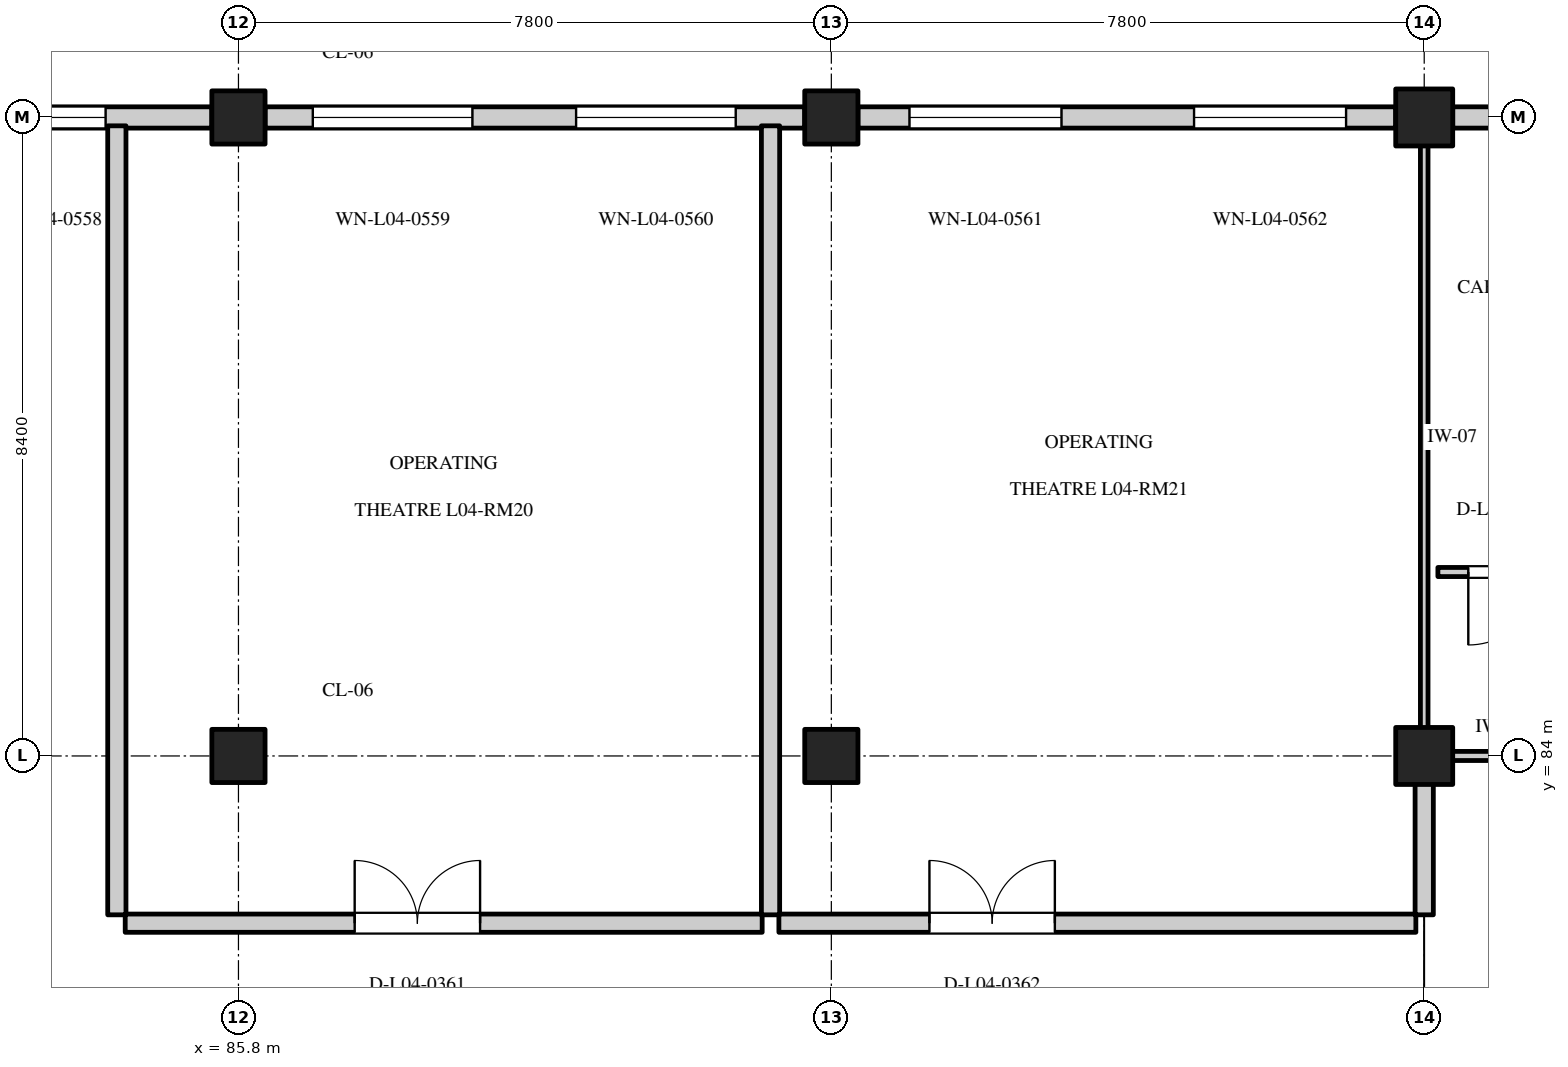
"""IFC4 building model, lengths in metres.
Left out: names, types, materials, properties, quantities, classifications, styles, units other than length and angle.
Written with IfcOpenShell. Run it as: python <this file> out.ifc"""

import sys

from ifc_helpers import new_model, si_unit, direction, frame, frame_2d, origin, origin_2d, place, context, subcontext, project, spatial, rectangle, extrude, element, fill, save


model = new_model("IFC4")
c1 = context("Model", 3, precision=1e-05, world=origin(), true_north=direction((0.0, 1.0)))
c2 = subcontext(c1, "Body", "Model", "MODEL_VIEW")
j1 = project(units=[si_unit("LENGTHUNIT", "METRE"), si_unit("PLANEANGLEUNIT", "RADIAN")], contexts=[c1])
p1 = place(None, origin())
s1 = spatial("IfcSite", under=j1, at=p1, CompositionType="ELEMENT")
p2 = place(p1, origin())
s2 = spatial("IfcBuilding", under=s1, at=p2, CompositionType="ELEMENT")
p3 = place(p2, frame((0.0, 0.0, 18.0)))
s3 = spatial("IfcBuildingStorey", under=s2, at=p3, CompositionType="ELEMENT", Elevation=18.0)
for number, where, z_axis, x_axis in (
    (1, (85.8, 84.0, 0.0), (0.0, 0.0, 1.0), (1.0, 0.0, 0.0)),
    (2, (85.8, 92.4, 0.0), (0.0, 0.0, 1.0), (1.0, 0.0, 0.0)),
    (3, (93.6, 84.0, 0.0), (0.0, 0.0, 1.0), (1.0, 0.0, 0.0)),
    (4, (93.6, 92.4, 0.0), (0.0, 0.0, 1.0), (1.0, 0.0, 0.0)),
):
    element("IfcColumn", number, at=place(p3, frame(where, z_axis=z_axis, x_axis=x_axis)), inside=s3, PredefinedType="COLUMN", context=c2, shape_type="SweptSolid", body=[
        extrude(rectangle(XDim=0.7, YDim=0.7, at=origin_2d()), origin(), (0.0, 0.0, 1.0), 4.2),
    ])
for number, where, z_axis, x_axis in (
    (5, (101.4, 84.0, 0.0), (0.0, 0.0, 1.0), (1.0, 0.0, 0.0)),
    (6, (101.4, 92.4, 0.0), (0.0, 0.0, 1.0), (1.0, 0.0, 0.0)),
):
    element("IfcColumn", number, at=place(p3, frame(where, z_axis=z_axis, x_axis=x_axis)), inside=s3, PredefinedType="COLUMN", context=c2, shape_type="SweptSolid", body=[
        extrude(rectangle(XDim=0.75, YDim=0.75, at=origin_2d()), origin(), (0.0, 0.0, 1.0), 4.2),
    ])
p4 = place(p3, frame((78.35, 92.4, 0.0), z_axis=(0.0, 0.0, 1.0), x_axis=(1.0, 0.0, 0.0)))
e7 = element("IfcWall", 7, at=p4, inside=s3, PredefinedType="STANDARD", context=c2, shape_type="SweptSolid", body=[
    extrude(rectangle(XDim=7.1, YDim=0.28, at=frame_2d((3.55, 0.0))), origin(), (0.0, 0.0, 1.0), 3.335),
])
p5 = place(p4, frame((0.628, 0.0, 0.8)))
e8 = element("IfcOpeningElement", 8, at=p5, cuts=e7, PredefinedType="OPENING", context=c2, shape_type="SweptSolid", body=[
    extrude(rectangle(XDim=2.1, YDim=1.55, at=frame_2d((1.05, 0.775))), frame((0.0, 0.152, 0.0), z_axis=(0.0, -1.0, 0.0), x_axis=(1.0, 0.0, 0.0)), (0.0, 0.0, 1.0), 0.304),
])
p6 = place(p4, frame((4.102, 0.0, 0.8)))
e9 = element("IfcOpeningElement", 9, at=p6, cuts=e7, PredefinedType="OPENING", context=c2, shape_type="SweptSolid", body=[
    extrude(rectangle(XDim=1.6, YDim=1.65, at=frame_2d((0.8, 0.825))), frame((0.0, 0.152, 0.0), z_axis=(0.0, -1.0, 0.0), x_axis=(1.0, 0.0, 0.0)), (0.0, 0.0, 1.0), 0.304),
])
p7 = place(p3, frame((86.15, 92.4, 0.0), z_axis=(0.0, 0.0, 1.0), x_axis=(1.0, 0.0, 0.0)))
e10 = element("IfcWall", 10, at=p7, inside=s3, PredefinedType="STANDARD", context=c2, shape_type="SweptSolid", body=[
    extrude(rectangle(XDim=7.1, YDim=0.28, at=frame_2d((3.55, 0.0))), origin(), (0.0, 0.0, 1.0), 3.335),
])
p8 = place(p7, frame((0.628, 0.0, 0.8)))
e11 = element("IfcOpeningElement", 11, at=p8, cuts=e10, PredefinedType="OPENING", context=c2, shape_type="SweptSolid", body=[
    extrude(rectangle(XDim=2.1, YDim=1.45, at=frame_2d((1.05, 0.725))), frame((0.0, 0.152, 0.0), z_axis=(0.0, -1.0, 0.0), x_axis=(1.0, 0.0, 0.0)), (0.0, 0.0, 1.0), 0.304),
])
p9 = place(p7, frame((4.092, 0.0, 0.8)))
e12 = element("IfcOpeningElement", 12, at=p9, cuts=e10, PredefinedType="OPENING", context=c2, shape_type="SweptSolid", body=[
    extrude(rectangle(XDim=2.1, YDim=1.45, at=frame_2d((1.05, 0.725))), frame((0.0, 0.152, 0.0), z_axis=(0.0, -1.0, 0.0), x_axis=(1.0, 0.0, 0.0)), (0.0, 0.0, 1.0), 0.304),
])
p10 = place(p3, frame((93.95, 92.4, 0.0), z_axis=(0.0, 0.0, 1.0), x_axis=(1.0, 0.0, 0.0)))
e13 = element("IfcWall", 13, at=p10, inside=s3, PredefinedType="STANDARD", context=c2, shape_type="SweptSolid", body=[
    extrude(rectangle(XDim=7.075, YDim=0.28, at=frame_2d((3.538, 0.0))), origin(), (0.0, 0.0, 1.0), 3.335),
])
p11 = place(p10, frame((0.678, 0.0, 0.8)))
e14 = element("IfcOpeningElement", 14, at=p11, cuts=e13, PredefinedType="OPENING", context=c2, shape_type="SweptSolid", body=[
    extrude(rectangle(XDim=2.0, YDim=1.75, at=frame_2d((1.0, 0.875))), frame((0.0, 0.152, 0.0), z_axis=(0.0, -1.0, 0.0), x_axis=(1.0, 0.0, 0.0)), (0.0, 0.0, 1.0), 0.304),
])
p12 = place(p10, frame((4.422, 0.0, 0.8)))
e15 = element("IfcOpeningElement", 15, at=p12, cuts=e13, PredefinedType="OPENING", context=c2, shape_type="SweptSolid", body=[
    extrude(rectangle(XDim=2.0, YDim=1.75, at=frame_2d((1.0, 0.875))), frame((0.0, 0.152, 0.0), z_axis=(0.0, -1.0, 0.0), x_axis=(1.0, 0.0, 0.0)), (0.0, 0.0, 1.0), 0.304),
])
p13 = place(p3, frame((101.775, 92.4, 0.0), z_axis=(0.0, 0.0, 1.0), x_axis=(1.0, 0.0, 0.0)))
e16 = element("IfcWall", 16, at=p13, inside=s3, PredefinedType="STANDARD", context=c2, shape_type="SweptSolid", body=[
    extrude(rectangle(XDim=7.075, YDim=0.28, at=frame_2d((3.538, 0.0))), origin(), (0.0, 0.0, 1.0), 3.335),
])
p14 = place(p13, frame((0.653, 0.0, 0.8)))
e17 = element("IfcOpeningElement", 17, at=p14, cuts=e16, PredefinedType="OPENING", context=c2, shape_type="SweptSolid", body=[
    extrude(rectangle(XDim=2.0, YDim=1.65, at=frame_2d((1.0, 0.825))), frame((0.0, 0.152, 0.0), z_axis=(0.0, -1.0, 0.0), x_axis=(1.0, 0.0, 0.0)), (0.0, 0.0, 1.0), 0.304),
])
p15 = place(p13, frame((4.397, 0.0, 0.8)))
e18 = element("IfcOpeningElement", 18, at=p15, cuts=e16, PredefinedType="OPENING", context=c2, shape_type="SweptSolid", body=[
    extrude(rectangle(XDim=2.0, YDim=1.65, at=frame_2d((1.0, 0.825))), frame((0.0, 0.152, 0.0), z_axis=(0.0, -1.0, 0.0), x_axis=(1.0, 0.0, 0.0)), (0.0, 0.0, 1.0), 0.304),
])
p16 = place(p3, frame((101.4, 84.12, 0.0), z_axis=(0.0, 0.0, 1.0), x_axis=(0.0, 1.0, 0.0)))
e19 = element("IfcWall", 19, at=p16, inside=s3, PredefinedType="PARTITIONING", context=c2, shape_type="SweptSolid", body=[
    extrude(rectangle(XDim=8.16, YDim=0.1, at=frame_2d((4.08, 0.0))), origin(), (0.0, 0.0, 1.0), 3.235),
])
p17 = place(p3, frame((101.52, 84.0, 0.0), z_axis=(0.0, 0.0, 1.0), x_axis=(1.0, 0.0, 0.0)))
e20 = element("IfcWall", 20, at=p17, inside=s3, PredefinedType="PARTITIONING", context=c2, shape_type="SweptSolid", body=[
    extrude(rectangle(XDim=1.76, YDim=0.12, at=frame_2d((0.88, 0.0))), origin(), (0.0, 0.0, 1.0), 3.235),
])
p18 = place(p3, frame((101.58, 86.42, 0.0), z_axis=(0.0, 0.0, 1.0), x_axis=(1.0, 0.0, 0.0)))
e21 = element("IfcWall", 21, at=p18, inside=s3, PredefinedType="PARTITIONING", context=c2, shape_type="SweptSolid", body=[
    extrude(rectangle(XDim=1.76, YDim=0.12, at=frame_2d((0.88, 0.0))), origin(), (0.0, 0.0, 1.0), 3.865),
])
p19 = place(p18, frame((0.4, 0.0, 0.0)))
e22 = element("IfcOpeningElement", 22, at=p19, cuts=e21, PredefinedType="OPENING", context=c2, shape_type="SweptSolid", body=[
    extrude(rectangle(XDim=0.96, YDim=2.12, at=frame_2d((0.48, 1.06))), frame((0.0, 0.072, 0.0), z_axis=(0.0, -1.0, 0.0), x_axis=(1.0, 0.0, 0.0)), (0.0, 0.0, 1.0), 0.144),
])
p20 = place(p3, frame((84.31, 81.8, 0.0), z_axis=(0.0, 0.0, 1.0), x_axis=(1.0, 0.0, 0.0)))
e23 = element("IfcWall", 23, at=p20, inside=s3, PredefinedType="STANDARD", context=c2, shape_type="SweptSolid", body=[
    extrude(rectangle(XDim=8.38, YDim=0.24, at=frame_2d((4.19, 0.0))), origin(), (0.0, 0.0, 1.0), 3.865),
])
p21 = place(p20, frame((3.019, 0.0, 0.0)))
e24 = element("IfcOpeningElement", 24, at=p21, cuts=e23, PredefinedType="OPENING", context=c2, shape_type="SweptSolid", body=[
    extrude(rectangle(XDim=1.65, YDim=2.25, at=frame_2d((0.825, 1.125))), frame((0.0, 0.132, 0.0), z_axis=(0.0, -1.0, 0.0), x_axis=(1.0, 0.0, 0.0)), (0.0, 0.0, 1.0), 0.264),
])
p22 = place(p3, frame((85.49, 92.4, 0.0), z_axis=(0.0, 0.0, 1.0), x_axis=(1.0, 0.0, 0.0)))
e25 = element("IfcWall", 25, at=p22, inside=s3, PredefinedType="STANDARD", context=c2, shape_type="SweptSolid", body=[
    extrude(rectangle(XDim=0.62, YDim=0.24, at=frame_2d((0.31, 0.0))), origin(), (0.0, 0.0, 1.0), 3.235),
])
for number, where, z_axis, x_axis in (
    (26, (84.2, 81.91, 0.0), (0.0, 0.0, 1.0), (0.0, 1.0, 0.0)),
    (27, (92.8, 81.91, 0.0), (0.0, 0.0, 1.0), (0.0, 1.0, 0.0)),
):
    element("IfcWall", number, at=place(p3, frame(where, z_axis=z_axis, x_axis=x_axis)), inside=s3, PredefinedType="STANDARD", context=c2, shape_type="SweptSolid", body=[
        extrude(rectangle(XDim=10.38, YDim=0.24, at=frame_2d((5.19, 0.0))), origin(), (0.0, 0.0, 1.0), 3.865),
    ])
p23 = place(p3, frame((92.91, 81.8, 0.0), z_axis=(0.0, 0.0, 1.0), x_axis=(1.0, 0.0, 0.0)))
e28 = element("IfcWall", 28, at=p23, inside=s3, PredefinedType="STANDARD", context=c2, shape_type="SweptSolid", body=[
    extrude(rectangle(XDim=8.38, YDim=0.24, at=frame_2d((4.19, 0.0))), origin(), (0.0, 0.0, 1.0), 3.865),
])
p24 = place(p23, frame((1.981, 0.0, 0.0)))
e29 = element("IfcOpeningElement", 29, at=p24, cuts=e28, PredefinedType="OPENING", context=c2, shape_type="SweptSolid", body=[
    extrude(rectangle(XDim=1.65, YDim=2.25, at=frame_2d((0.825, 1.125))), frame((0.0, 0.132, 0.0), z_axis=(0.0, -1.0, 0.0), x_axis=(1.0, 0.0, 0.0)), (0.0, 0.0, 1.0), 0.264),
])
p25 = place(p3, frame((93.29, 92.4, 0.0), z_axis=(0.0, 0.0, 1.0), x_axis=(1.0, 0.0, 0.0)))
e30 = element("IfcWall", 30, at=p25, inside=s3, PredefinedType="STANDARD", context=c2, shape_type="SweptSolid", body=[
    extrude(rectangle(XDim=0.62, YDim=0.24, at=frame_2d((0.31, 0.0))), origin(), (0.0, 0.0, 1.0), 3.235),
])
p26 = place(p3, frame((101.4, 81.91, 0.0), z_axis=(0.0, 0.0, 1.0), x_axis=(0.0, 1.0, 0.0)))
e31 = element("IfcWall", 31, at=p26, inside=s3, PredefinedType="STANDARD", context=c2, shape_type="SweptSolid", body=[
    extrude(rectangle(XDim=2.17, YDim=0.24, at=frame_2d((1.085, 0.0))), origin(), (0.0, 0.0, 1.0), 3.235),
])
p27 = place(p6, origin())
e32 = element("IfcWindow", 32, at=p27, inside=s3, PartitioningType="DOUBLE_PANEL_VERTICAL", PredefinedType="WINDOW", context=c2, shape_type="SweptSolid", body=[
    extrude(rectangle(XDim=1.6, YDim=1.65, at=frame_2d((0.8, 0.825))), frame((0.0, 0.03, 0.0), z_axis=(0.0, -1.0, 0.0), x_axis=(1.0, 0.0, 0.0)), (0.0, 0.0, 1.0), 0.06),
])
fill(e9, e32)
p28 = place(p8, origin())
e33 = element("IfcWindow", 33, at=p28, inside=s3, PartitioningType="DOUBLE_PANEL_VERTICAL", PredefinedType="WINDOW", context=c2, shape_type="SweptSolid", body=[
    extrude(rectangle(XDim=2.1, YDim=1.45, at=frame_2d((1.05, 0.725))), frame((0.0, 0.03, 0.0), z_axis=(0.0, -1.0, 0.0), x_axis=(1.0, 0.0, 0.0)), (0.0, 0.0, 1.0), 0.06),
])
fill(e11, e33)
p29 = place(p9, origin())
e34 = element("IfcWindow", 34, at=p29, inside=s3, PartitioningType="DOUBLE_PANEL_VERTICAL", PredefinedType="WINDOW", context=c2, shape_type="SweptSolid", body=[
    extrude(rectangle(XDim=2.1, YDim=1.45, at=frame_2d((1.05, 0.725))), frame((0.0, 0.03, 0.0), z_axis=(0.0, -1.0, 0.0), x_axis=(1.0, 0.0, 0.0)), (0.0, 0.0, 1.0), 0.06),
])
fill(e12, e34)
p30 = place(p11, origin())
e35 = element("IfcWindow", 35, at=p30, inside=s3, PartitioningType="DOUBLE_PANEL_VERTICAL", PredefinedType="WINDOW", context=c2, shape_type="SweptSolid", body=[
    extrude(rectangle(XDim=2.0, YDim=1.75, at=frame_2d((1.0, 0.875))), frame((0.0, 0.03, 0.0), z_axis=(0.0, -1.0, 0.0), x_axis=(1.0, 0.0, 0.0)), (0.0, 0.0, 1.0), 0.06),
])
fill(e14, e35)
p31 = place(p12, origin())
e36 = element("IfcWindow", 36, at=p31, inside=s3, PartitioningType="DOUBLE_PANEL_VERTICAL", PredefinedType="WINDOW", context=c2, shape_type="SweptSolid", body=[
    extrude(rectangle(XDim=2.0, YDim=1.75, at=frame_2d((1.0, 0.875))), frame((0.0, 0.03, 0.0), z_axis=(0.0, -1.0, 0.0), x_axis=(1.0, 0.0, 0.0)), (0.0, 0.0, 1.0), 0.06),
])
fill(e15, e36)
p32 = place(p19, frame((0.96, 0.0, 0.0), z_axis=(0.0, 0.0, 1.0), x_axis=(-1.0, 0.0, 0.0)))
e37 = element("IfcDoor", 37, at=p32, inside=s3, OperationType="SINGLE_SWING_RIGHT", PredefinedType="DOOR", context=c2, shape_type="SweptSolid", body=[
    extrude(rectangle(XDim=0.96, YDim=2.12, at=frame_2d((0.48, 1.06))), frame((0.0, 0.025, 0.0), z_axis=(0.0, -1.0, 0.0), x_axis=(1.0, 0.0, 0.0)), (0.0, 0.0, 1.0), 0.05),
])
fill(e22, e37)
p33 = place(p21, origin())
e38 = element("IfcDoor", 38, at=p33, inside=s3, OperationType="DOUBLE_DOOR_SINGLE_SWING", PredefinedType="DOOR", context=c2, shape_type="SweptSolid", body=[
    extrude(rectangle(XDim=1.65, YDim=2.25, at=frame_2d((0.825, 1.125))), frame((0.0, 0.025, 0.0), z_axis=(0.0, -1.0, 0.0), x_axis=(1.0, 0.0, 0.0)), (0.0, 0.0, 1.0), 0.05),
])
fill(e24, e38)
p34 = place(p24, origin())
e39 = element("IfcDoor", 39, at=p34, inside=s3, OperationType="DOUBLE_DOOR_SINGLE_SWING", PredefinedType="DOOR", context=c2, shape_type="SweptSolid", body=[
    extrude(rectangle(XDim=1.65, YDim=2.25, at=frame_2d((0.825, 1.125))), frame((0.0, 0.025, 0.0), z_axis=(0.0, -1.0, 0.0), x_axis=(1.0, 0.0, 0.0)), (0.0, 0.0, 1.0), 0.05),
])
fill(e29, e39)
save(model, sys.argv[1])
